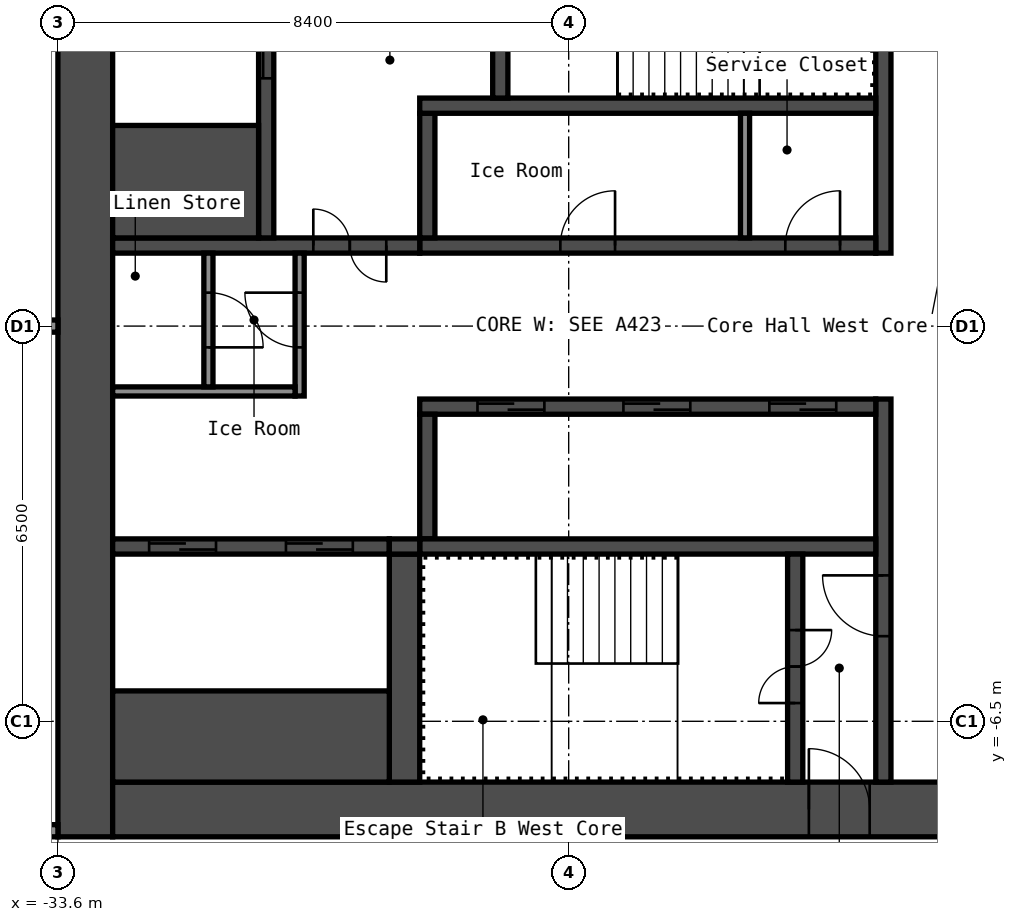
"""IFC4 building model, lengths in metres.
Left out: names, types, materials, properties, quantities, classifications, styles, units other than length and angle.
Written with IfcOpenShell. Run it as: python <this file> out.ifc"""

import sys

from ifc_helpers import new_model, si_unit, direction, frame, frame_2d, origin, place, context, subcontext, project, spatial, rectangle, extrude, element, fill, save


model = new_model("IFC4")
c1 = context("Model", 3, precision=1e-05, world=origin(), true_north=direction((0.0, 1.0)))
c2 = subcontext(c1, "Body", "Model", "MODEL_VIEW")
j1 = project(units=[si_unit("LENGTHUNIT", "METRE"), si_unit("PLANEANGLEUNIT", "RADIAN")], contexts=[c1])
p1 = place(None, origin())
s1 = spatial("IfcSite", under=j1, at=p1, CompositionType="ELEMENT")
p2 = place(p1, origin())
s2 = spatial("IfcBuilding", under=s1, at=p2, CompositionType="ELEMENT")
p3 = place(p2, frame((0.0, 0.0, 156.6)))
s3 = spatial("IfcBuildingStorey", under=s2, at=p3, CompositionType="ELEMENT", Elevation=156.6)
p4 = place(p3, frame((-33.15, -8.4, 0.0), z_axis=(0.0, 0.0, 1.0), x_axis=(0.0, 1.0, 0.0)))
e1 = element("IfcWall", 1, at=p4, inside=s3, PredefinedType="SHEAR", context=c2, shape_type="SweptSolid", body=[
    extrude(rectangle(XDim=16.8, YDim=0.9, at=frame_2d((8.4, 0.0))), origin(), (0.0, 0.0, 1.0), 2.75),
])
p5 = place(p3, frame((-32.7, -7.95, 0.0), z_axis=(0.0, 0.0, 1.0), x_axis=(1.0, 0.0, 0.0)))
e2 = element("IfcWall", 2, at=p5, inside=s3, PredefinedType="SHEAR", context=c2, shape_type="SweptSolid", body=[
    extrude(rectangle(XDim=15.0, YDim=0.9, at=frame_2d((7.5, 0.0))), origin(), (0.0, 0.0, 1.0), 2.75),
])
p6 = place(p5, frame((11.45, 0.0, 0.0)))
e3 = element("IfcOpeningElement", 3, at=p6, cuts=e2, PredefinedType="OPENING", context=c2, shape_type="SweptSolid", body=[
    extrude(rectangle(XDim=1.0, YDim=2.1, at=frame_2d((0.5, 1.05))), frame((0.0, 0.46, 0.0), z_axis=(0.0, -1.0, 0.0), x_axis=(1.0, 0.0, 0.0)), (0.0, 0.0, 1.0), 0.92),
])
p7 = place(p3, frame((-20.025, 1.2, 0.0), z_axis=(0.0, 0.0, 1.0), x_axis=(0.0, 1.0, 0.0)))
e4 = element("IfcWall", 4, at=p7, inside=s3, PredefinedType="SHEAR", context=c2, shape_type="SweptSolid", body=[
    extrude(rectangle(XDim=6.3, YDim=0.25, at=frame_2d((3.15, 0.0))), origin(), (0.0, 0.0, 1.0), 2.75),
])
p8 = place(p3, frame((-20.025, -7.5, 0.0), z_axis=(0.0, 0.0, 1.0), x_axis=(0.0, 1.0, 0.0)))
e5 = element("IfcWall", 5, at=p8, inside=s3, PredefinedType="SHEAR", context=c2, shape_type="SweptSolid", body=[
    extrude(rectangle(XDim=6.3, YDim=0.25, at=frame_2d((3.15, 0.0))), origin(), (0.0, 0.0, 1.0), 2.75),
])
p9 = place(p8, frame((2.4, 0.0, 0.0)))
e6 = element("IfcOpeningElement", 6, at=p9, cuts=e5, PredefinedType="OPENING", context=c2, shape_type="SweptSolid", body=[
    extrude(rectangle(XDim=1.0, YDim=2.1, at=frame_2d((0.5, 1.05))), frame((0.0, 0.135, 0.0), z_axis=(0.0, -1.0, 0.0), x_axis=(1.0, 0.0, 0.0)), (0.0, 0.0, 1.0), 0.27),
])
p10 = place(p3, frame((-27.65, 1.325, 0.0), z_axis=(0.0, 0.0, 1.0), x_axis=(1.0, 0.0, 0.0)))
e7 = element("IfcWall", 7, at=p10, inside=s3, PredefinedType="SHEAR", context=c2, shape_type="SweptSolid", body=[
    extrude(rectangle(XDim=7.5, YDim=0.25, at=frame_2d((3.75, 0.0))), origin(), (0.0, 0.0, 1.0), 2.75),
])
p11 = place(p10, frame((6.012, 0.0, 0.0)))
e8 = element("IfcOpeningElement", 8, at=p11, cuts=e7, PredefinedType="OPENING", context=c2, shape_type="SweptSolid", body=[
    extrude(rectangle(XDim=0.9, YDim=2.1, at=frame_2d((0.45, 1.05))), frame((0.0, 0.135, 0.0), z_axis=(0.0, -1.0, 0.0), x_axis=(1.0, 0.0, 0.0)), (0.0, 0.0, 1.0), 0.27),
])
p12 = place(p10, frame((2.312, 0.0, 0.0)))
e9 = element("IfcOpeningElement", 9, at=p12, cuts=e7, PredefinedType="OPENING", context=c2, shape_type="SweptSolid", body=[
    extrude(rectangle(XDim=0.9, YDim=2.1, at=frame_2d((0.45, 1.05))), frame((0.0, 0.135, 0.0), z_axis=(0.0, -1.0, 0.0), x_axis=(1.0, 0.0, 0.0)), (0.0, 0.0, 1.0), 0.27),
])
p13 = place(p3, frame((-27.525, 1.45, 0.0), z_axis=(0.0, 0.0, 1.0), x_axis=(0.0, 1.0, 0.0)))
e10 = element("IfcWall", 10, at=p13, inside=s3, PredefinedType="SHEAR", context=c2, shape_type="SweptSolid", body=[
    extrude(rectangle(XDim=2.05, YDim=0.25, at=frame_2d((1.025, 0.0))), origin(), (0.0, 0.0, 1.0), 2.75),
])
p14 = place(p3, frame((-27.65, 3.625, 0.0), z_axis=(0.0, 0.0, 1.0), x_axis=(1.0, 0.0, 0.0)))
e11 = element("IfcWall", 11, at=p14, inside=s3, PredefinedType="SHEAR", context=c2, shape_type="SweptSolid", body=[
    extrude(rectangle(XDim=7.5, YDim=0.25, at=frame_2d((3.75, 0.0))), origin(), (0.0, 0.0, 1.0), 2.75),
])
p15 = place(p3, frame((-26.325, 3.75, 0.0), z_axis=(0.0, 0.0, 1.0), x_axis=(0.0, 1.0, 0.0)))
e12 = element("IfcWall", 12, at=p15, inside=s3, PredefinedType="SHEAR", context=c2, shape_type="SweptSolid", body=[
    extrude(rectangle(XDim=3.75, YDim=0.25, at=frame_2d((1.875, 0.0))), origin(), (0.0, 0.0, 1.0), 2.75),
])
p16 = place(p15, frame((1.25, 0.0, 0.0)))
e13 = element("IfcOpeningElement", 13, at=p16, cuts=e12, PredefinedType="OPENING", context=c2, shape_type="SweptSolid", body=[
    extrude(rectangle(XDim=1.2, YDim=2.1, at=frame_2d((0.6, 1.05))), frame((0.0, 0.135, 0.0), z_axis=(0.0, -1.0, 0.0), x_axis=(1.0, 0.0, 0.0)), (0.0, 0.0, 1.0), 0.27),
])
p17 = place(p3, frame((-32.7, 1.325, 0.0), z_axis=(0.0, 0.0, 1.0), x_axis=(1.0, 0.0, 0.0)))
e14 = element("IfcWall", 14, at=p17, inside=s3, PredefinedType="SHEAR", context=c2, shape_type="SweptSolid", body=[
    extrude(rectangle(XDim=5.05, YDim=0.25, at=frame_2d((2.525, 0.0))), origin(), (0.0, 0.0, 1.0), 2.75),
])
p18 = place(p17, frame((3.3, 0.0, 0.0)))
e15 = element("IfcOpeningElement", 15, at=p18, cuts=e14, PredefinedType="OPENING", context=c2, shape_type="SweptSolid", body=[
    extrude(rectangle(XDim=1.2, YDim=2.1, at=frame_2d((0.6, 1.05))), frame((0.0, 0.135, 0.0), z_axis=(0.0, -1.0, 0.0), x_axis=(1.0, 0.0, 0.0)), (0.0, 0.0, 1.0), 0.27),
])
p19 = place(p3, frame((-30.175, 1.45, 0.0), z_axis=(0.0, 0.0, 1.0), x_axis=(0.0, 1.0, 0.0)))
e16 = element("IfcWall", 16, at=p19, inside=s3, PredefinedType="SHEAR", context=c2, shape_type="SweptSolid", body=[
    extrude(rectangle(XDim=6.05, YDim=0.25, at=frame_2d((3.025, 0.0))), origin(), (0.0, 0.0, 1.0), 2.75),
])
p20 = place(p19, frame((2.625, 0.0, 0.0)))
e17 = element("IfcOpeningElement", 17, at=p20, cuts=e16, PredefinedType="OPENING", context=c2, shape_type="SweptSolid", body=[
    extrude(rectangle(XDim=1.1, YDim=2.1, at=frame_2d((0.55, 1.05))), frame((0.0, 0.135, 0.0), z_axis=(0.0, -1.0, 0.0), x_axis=(1.0, 0.0, 0.0)), (0.0, 0.0, 1.0), 0.27),
])
p21 = place(p3, frame((-32.7, 2.375, 0.0), z_axis=(0.0, 0.0, 1.0), x_axis=(1.0, 0.0, 0.0)))
e18 = element("IfcWall", 18, at=p21, inside=s3, PredefinedType="SHEAR", context=c2, shape_type="SweptSolid", body=[
    extrude(rectangle(XDim=2.4, YDim=1.85, at=frame_2d((1.2, 0.0))), origin(), (0.0, 0.0, 1.0), 2.75),
])
p22 = place(p3, frame((-27.65, -1.325, 0.0), z_axis=(0.0, 0.0, 1.0), x_axis=(1.0, 0.0, 0.0)))
e19 = element("IfcWall", 19, at=p22, inside=s3, PredefinedType="SHEAR", context=c2, shape_type="SweptSolid", body=[
    extrude(rectangle(XDim=7.5, YDim=0.25, at=frame_2d((3.75, 0.0))), origin(), (0.0, 0.0, 1.0), 2.75),
])
p23 = place(p22, frame((5.75, 0.0, 0.0)))
e20 = element("IfcOpeningElement", 20, at=p23, cuts=e19, PredefinedType="OPENING", context=c2, shape_type="SweptSolid", body=[
    extrude(rectangle(XDim=1.1, YDim=2.1, at=frame_2d((0.55, 1.05))), frame((0.0, 0.135, 0.0), z_axis=(0.0, -1.0, 0.0), x_axis=(1.0, 0.0, 0.0)), (0.0, 0.0, 1.0), 0.27),
])
p24 = place(p22, frame((3.35, 0.0, 0.0)))
e21 = element("IfcOpeningElement", 21, at=p24, cuts=e19, PredefinedType="OPENING", context=c2, shape_type="SweptSolid", body=[
    extrude(rectangle(XDim=1.1, YDim=2.1, at=frame_2d((0.55, 1.05))), frame((0.0, 0.135, 0.0), z_axis=(0.0, -1.0, 0.0), x_axis=(1.0, 0.0, 0.0)), (0.0, 0.0, 1.0), 0.27),
])
p25 = place(p22, frame((0.95, 0.0, 0.0)))
e22 = element("IfcOpeningElement", 22, at=p25, cuts=e19, PredefinedType="OPENING", context=c2, shape_type="SweptSolid", body=[
    extrude(rectangle(XDim=1.1, YDim=2.1, at=frame_2d((0.55, 1.05))), frame((0.0, 0.135, 0.0), z_axis=(0.0, -1.0, 0.0), x_axis=(1.0, 0.0, 0.0)), (0.0, 0.0, 1.0), 0.27),
])
p26 = place(p3, frame((-27.525, -3.5, 0.0), z_axis=(0.0, 0.0, 1.0), x_axis=(0.0, 1.0, 0.0)))
e23 = element("IfcWall", 23, at=p26, inside=s3, PredefinedType="SHEAR", context=c2, shape_type="SweptSolid", body=[
    extrude(rectangle(XDim=2.05, YDim=0.25, at=frame_2d((1.025, 0.0))), origin(), (0.0, 0.0, 1.0), 2.75),
])
p27 = place(p3, frame((-27.65, -3.625, 0.0), z_axis=(0.0, 0.0, 1.0), x_axis=(1.0, 0.0, 0.0)))
e24 = element("IfcWall", 24, at=p27, inside=s3, PredefinedType="SHEAR", context=c2, shape_type="SweptSolid", body=[
    extrude(rectangle(XDim=7.5, YDim=0.25, at=frame_2d((3.75, 0.0))), origin(), (0.0, 0.0, 1.0), 2.75),
])
p28 = place(p3, frame((-21.475, -7.5, 0.0), z_axis=(0.0, 0.0, 1.0), x_axis=(0.0, 1.0, 0.0)))
e25 = element("IfcWall", 25, at=p28, inside=s3, PredefinedType="SHEAR", context=c2, shape_type="SweptSolid", body=[
    extrude(rectangle(XDim=3.75, YDim=0.25, at=frame_2d((1.875, 0.0))), origin(), (0.0, 0.0, 1.0), 2.75),
])
p29 = place(p28, frame((1.3, 0.0, 0.0)))
e26 = element("IfcOpeningElement", 26, at=p29, cuts=e25, PredefinedType="OPENING", context=c2, shape_type="SweptSolid", body=[
    extrude(rectangle(XDim=1.2, YDim=2.1, at=frame_2d((0.6, 1.05))), frame((0.0, 0.135, 0.0), z_axis=(0.0, -1.0, 0.0), x_axis=(1.0, 0.0, 0.0)), (0.0, 0.0, 1.0), 0.27),
])
p30 = place(p3, frame((-27.9, -7.5, 0.0), z_axis=(0.0, 0.0, 1.0), x_axis=(0.0, 1.0, 0.0)))
e27 = element("IfcWall", 27, at=p30, inside=s3, PredefinedType="SHEAR", context=c2, shape_type="SweptSolid", body=[
    extrude(rectangle(XDim=3.75, YDim=0.5, at=frame_2d((1.875, 0.0))), origin(), (0.0, 0.0, 1.0), 2.75),
])
p31 = place(p3, frame((-32.7, -3.625, 0.0), z_axis=(0.0, 0.0, 1.0), x_axis=(1.0, 0.0, 0.0)))
e28 = element("IfcWall", 28, at=p31, inside=s3, PredefinedType="SHEAR", context=c2, shape_type="SweptSolid", body=[
    extrude(rectangle(XDim=4.55, YDim=0.25, at=frame_2d((2.275, 0.0))), origin(), (0.0, 0.0, 1.0), 2.75),
])
p32 = place(p31, frame((2.85, 0.0, 0.0)))
e29 = element("IfcOpeningElement", 29, at=p32, cuts=e28, PredefinedType="OPENING", context=c2, shape_type="SweptSolid", body=[
    extrude(rectangle(XDim=1.1, YDim=2.1, at=frame_2d((0.55, 1.05))), frame((0.0, 0.135, 0.0), z_axis=(0.0, -1.0, 0.0), x_axis=(1.0, 0.0, 0.0)), (0.0, 0.0, 1.0), 0.27),
])
p33 = place(p31, frame((0.6, 0.0, 0.0)))
e30 = element("IfcOpeningElement", 30, at=p33, cuts=e28, PredefinedType="OPENING", context=c2, shape_type="SweptSolid", body=[
    extrude(rectangle(XDim=1.1, YDim=2.1, at=frame_2d((0.55, 1.05))), frame((0.0, 0.135, 0.0), z_axis=(0.0, -1.0, 0.0), x_axis=(1.0, 0.0, 0.0)), (0.0, 0.0, 1.0), 0.27),
])
p34 = place(p3, frame((-32.7, -6.75, 0.0), z_axis=(0.0, 0.0, 1.0), x_axis=(1.0, 0.0, 0.0)))
e31 = element("IfcWall", 31, at=p34, inside=s3, PredefinedType="SHEAR", context=c2, shape_type="SweptSolid", body=[
    extrude(rectangle(XDim=4.55, YDim=1.5, at=frame_2d((2.275, 0.0))), origin(), (0.0, 0.0, 1.0), 2.75),
])
p35 = place(p3, frame((-28.15, -3.625, 0.0), z_axis=(0.0, 0.0, 1.0), x_axis=(1.0, 0.0, 0.0)))
e32 = element("IfcWall", 32, at=p35, inside=s3, PredefinedType="SHEAR", context=c2, shape_type="SweptSolid", body=[
    extrude(rectangle(XDim=0.5, YDim=0.25, at=frame_2d((0.25, 0.0))), origin(), (0.0, 0.0, 1.0), 2.75),
])
p36 = place(p3, frame((-29.625, -1.15, 0.0), z_axis=(0.0, 0.0, 1.0), x_axis=(0.0, 1.0, 0.0)))
e33 = element("IfcWall", 33, at=p36, inside=s3, PredefinedType="PARTITIONING", context=c2, shape_type="SweptSolid", body=[
    extrude(rectangle(XDim=2.35, YDim=0.15, at=frame_2d((1.175, 0.0))), origin(), (0.0, 0.0, 1.0), 2.75),
])
p37 = place(p36, frame((0.8, 0.0, 0.0)))
e34 = element("IfcOpeningElement", 34, at=p37, cuts=e33, PredefinedType="OPENING", context=c2, shape_type="SweptSolid", body=[
    extrude(rectangle(XDim=0.9, YDim=2.1, at=frame_2d((0.45, 1.05))), frame((0.0, 0.085, 0.0), z_axis=(0.0, -1.0, 0.0), x_axis=(1.0, 0.0, 0.0)), (0.0, 0.0, 1.0), 0.17),
])
p38 = place(p3, frame((-32.7, -1.075, 0.0), z_axis=(0.0, 0.0, 1.0), x_axis=(1.0, 0.0, 0.0)))
e35 = element("IfcWall", 35, at=p38, inside=s3, PredefinedType="PARTITIONING", context=c2, shape_type="SweptSolid", body=[
    extrude(rectangle(XDim=3.0, YDim=0.15, at=frame_2d((1.5, 0.0))), origin(), (0.0, 0.0, 1.0), 2.75),
])
p39 = place(p3, frame((-31.125, -1.0, 0.0), z_axis=(0.0, 0.0, 1.0), x_axis=(0.0, 1.0, 0.0)))
e36 = element("IfcWall", 36, at=p39, inside=s3, PredefinedType="PARTITIONING", context=c2, shape_type="SweptSolid", body=[
    extrude(rectangle(XDim=2.2, YDim=0.15, at=frame_2d((1.1, 0.0))), origin(), (0.0, 0.0, 1.0), 2.75),
])
p40 = place(p39, frame((0.65, 0.0, 0.0)))
e37 = element("IfcOpeningElement", 37, at=p40, cuts=e36, PredefinedType="OPENING", context=c2, shape_type="SweptSolid", body=[
    extrude(rectangle(XDim=0.9, YDim=2.1, at=frame_2d((0.45, 1.05))), frame((0.0, 0.085, 0.0), z_axis=(0.0, -1.0, 0.0), x_axis=(1.0, 0.0, 0.0)), (0.0, 0.0, 1.0), 0.17),
])
p41 = place(p3, frame((-22.3, 1.45, 0.0), z_axis=(0.0, 0.0, 1.0), x_axis=(0.0, 1.0, 0.0)))
e38 = element("IfcWall", 38, at=p41, inside=s3, PredefinedType="PARTITIONING", context=c2, shape_type="SweptSolid", body=[
    extrude(rectangle(XDim=2.05, YDim=0.15, at=frame_2d((1.025, 0.0))), origin(), (0.0, 0.0, 1.0), 2.75),
])
p42 = place(p3, frame((-40.2, -8.3, 0.0), z_axis=(0.0, 0.0, 1.0), x_axis=(1.0, 0.0, 0.0)))
e39 = element("IfcWall", 39, at=p42, inside=s3, PredefinedType="PARTITIONING", context=c2, shape_type="SweptSolid", body=[
    extrude(rectangle(XDim=6.6, YDim=0.2, at=frame_2d((3.3, 0.0))), origin(), (0.0, 0.0, 1.0), 2.75),
])
p43 = place(p42, frame((1.07, 0.0, 0.0)))
e40 = element("IfcOpeningElement", 40, at=p43, cuts=e39, PredefinedType="OPENING", context=c2, shape_type="SweptSolid", body=[
    extrude(rectangle(XDim=0.9, YDim=2.1, at=frame_2d((0.45, 1.05))), frame((0.0, 0.11, 0.0), z_axis=(0.0, -1.0, 0.0), x_axis=(1.0, 0.0, 0.0)), (0.0, 0.0, 1.0), 0.22),
])
p44 = place(p42, frame((4.37, 0.0, 0.0)))
e41 = element("IfcOpeningElement", 41, at=p44, cuts=e39, PredefinedType="OPENING", context=c2, shape_type="SweptSolid", body=[
    extrude(rectangle(XDim=0.9, YDim=2.1, at=frame_2d((0.45, 1.05))), frame((0.0, 0.11, 0.0), z_axis=(0.0, -1.0, 0.0), x_axis=(1.0, 0.0, 0.0)), (0.0, 0.0, 1.0), 0.22),
])
p45 = place(p3, frame((-40.1, 0.0, 0.0), z_axis=(0.0, 0.0, 1.0), x_axis=(1.0, 0.0, 0.0)))
e42 = element("IfcWall", 42, at=p45, inside=s3, PredefinedType="PARTITIONING", context=c2, shape_type="SweptSolid", body=[
    extrude(rectangle(XDim=6.5, YDim=0.2, at=frame_2d((3.25, 0.0))), origin(), (0.0, 0.0, 1.0), 2.75),
])
p46 = place(p6, origin())
e43 = element("IfcDoor", 43, at=p46, inside=s3, OperationType="SINGLE_SWING_RIGHT", PredefinedType="DOOR", context=c2, shape_type="SweptSolid", body=[
    extrude(rectangle(XDim=1.0, YDim=2.1, at=frame_2d((0.5, 1.05))), frame((0.0, 0.025, 0.0), z_axis=(0.0, -1.0, 0.0), x_axis=(1.0, 0.0, 0.0)), (0.0, 0.0, 1.0), 0.05),
])
fill(e3, e43)
p47 = place(p29, origin())
e44 = element("IfcDoor", 44, at=p47, inside=s3, OperationType="DOUBLE_DOOR_SINGLE_SWING", PredefinedType="DOOR", context=c2, shape_type="SweptSolid", body=[
    extrude(rectangle(XDim=1.2, YDim=2.1, at=frame_2d((0.6, 1.05))), frame((0.0, 0.025, 0.0), z_axis=(0.0, -1.0, 0.0), x_axis=(1.0, 0.0, 0.0)), (0.0, 0.0, 1.0), 0.05),
])
fill(e26, e44)
p48 = place(p9, origin())
e45 = element("IfcDoor", 45, at=p48, inside=s3, OperationType="SINGLE_SWING_LEFT", PredefinedType="DOOR", context=c2, shape_type="SweptSolid", body=[
    extrude(rectangle(XDim=1.0, YDim=2.1, at=frame_2d((0.5, 1.05))), frame((0.0, 0.025, 0.0), z_axis=(0.0, -1.0, 0.0), x_axis=(1.0, 0.0, 0.0)), (0.0, 0.0, 1.0), 0.05),
])
fill(e6, e45)
p49 = place(p18, origin())
e46 = element("IfcDoor", 46, at=p49, inside=s3, OperationType="DOUBLE_DOOR_SINGLE_SWING", PredefinedType="DOOR", context=c2, shape_type="SweptSolid", body=[
    extrude(rectangle(XDim=1.2, YDim=2.1, at=frame_2d((0.6, 1.05))), frame((0.0, 0.025, 0.0), z_axis=(0.0, -1.0, 0.0), x_axis=(1.0, 0.0, 0.0)), (0.0, 0.0, 1.0), 0.05),
])
fill(e15, e46)
p50 = place(p37, origin())
e47 = element("IfcDoor", 47, at=p50, inside=s3, OperationType="SINGLE_SWING_LEFT", PredefinedType="DOOR", context=c2, shape_type="SweptSolid", body=[
    extrude(rectangle(XDim=0.9, YDim=2.1, at=frame_2d((0.45, 1.05))), frame((0.0, 0.025, 0.0), z_axis=(0.0, -1.0, 0.0), x_axis=(1.0, 0.0, 0.0)), (0.0, 0.0, 1.0), 0.05),
])
fill(e34, e47)
p51 = place(p40, origin())
e48 = element("IfcDoor", 48, at=p51, inside=s3, OperationType="SINGLE_SWING_LEFT", PredefinedType="DOOR", context=c2, shape_type="SweptSolid", body=[
    extrude(rectangle(XDim=0.9, YDim=2.1, at=frame_2d((0.45, 1.05))), frame((0.0, 0.025, 0.0), z_axis=(0.0, -1.0, 0.0), x_axis=(1.0, 0.0, 0.0)), (0.0, 0.0, 1.0), 0.05),
])
fill(e37, e48)
p52 = place(p11, origin())
e49 = element("IfcDoor", 49, at=p52, inside=s3, OperationType="SINGLE_SWING_LEFT", PredefinedType="DOOR", context=c2, shape_type="SweptSolid", body=[
    extrude(rectangle(XDim=0.9, YDim=2.1, at=frame_2d((0.45, 1.05))), frame((0.0, 0.025, 0.0), z_axis=(0.0, -1.0, 0.0), x_axis=(1.0, 0.0, 0.0)), (0.0, 0.0, 1.0), 0.05),
])
fill(e8, e49)
p53 = place(p12, origin())
e50 = element("IfcDoor", 50, at=p53, inside=s3, OperationType="SINGLE_SWING_LEFT", PredefinedType="DOOR", context=c2, shape_type="SweptSolid", body=[
    extrude(rectangle(XDim=0.9, YDim=2.1, at=frame_2d((0.45, 1.05))), frame((0.0, 0.025, 0.0), z_axis=(0.0, -1.0, 0.0), x_axis=(1.0, 0.0, 0.0)), (0.0, 0.0, 1.0), 0.05),
])
fill(e9, e50)
p54 = place(p23, origin())
e51 = element("IfcDoor", 51, at=p54, inside=s3, OperationType="DOUBLE_DOOR_SLIDING", PredefinedType="DOOR", context=c2, shape_type="SweptSolid", body=[
    extrude(rectangle(XDim=1.1, YDim=2.1, at=frame_2d((0.55, 1.05))), frame((0.0, 0.025, 0.0), z_axis=(0.0, -1.0, 0.0), x_axis=(1.0, 0.0, 0.0)), (0.0, 0.0, 1.0), 0.05),
])
fill(e20, e51)
p55 = place(p24, origin())
e52 = element("IfcDoor", 52, at=p55, inside=s3, OperationType="DOUBLE_DOOR_SLIDING", PredefinedType="DOOR", context=c2, shape_type="SweptSolid", body=[
    extrude(rectangle(XDim=1.1, YDim=2.1, at=frame_2d((0.55, 1.05))), frame((0.0, 0.025, 0.0), z_axis=(0.0, -1.0, 0.0), x_axis=(1.0, 0.0, 0.0)), (0.0, 0.0, 1.0), 0.05),
])
fill(e21, e52)
p56 = place(p25, origin())
e53 = element("IfcDoor", 53, at=p56, inside=s3, OperationType="DOUBLE_DOOR_SLIDING", PredefinedType="DOOR", context=c2, shape_type="SweptSolid", body=[
    extrude(rectangle(XDim=1.1, YDim=2.1, at=frame_2d((0.55, 1.05))), frame((0.0, 0.025, 0.0), z_axis=(0.0, -1.0, 0.0), x_axis=(1.0, 0.0, 0.0)), (0.0, 0.0, 1.0), 0.05),
])
fill(e22, e53)
p57 = place(p20, origin())
e54 = element("IfcDoor", 54, at=p57, inside=s3, OperationType="DOUBLE_DOOR_SLIDING", PredefinedType="DOOR", context=c2, shape_type="SweptSolid", body=[
    extrude(rectangle(XDim=1.1, YDim=2.1, at=frame_2d((0.55, 1.05))), frame((0.0, 0.025, 0.0), z_axis=(0.0, -1.0, 0.0), x_axis=(1.0, 0.0, 0.0)), (0.0, 0.0, 1.0), 0.05),
])
fill(e17, e54)
p58 = place(p32, origin())
e55 = element("IfcDoor", 55, at=p58, inside=s3, OperationType="DOUBLE_DOOR_SLIDING", PredefinedType="DOOR", context=c2, shape_type="SweptSolid", body=[
    extrude(rectangle(XDim=1.1, YDim=2.1, at=frame_2d((0.55, 1.05))), frame((0.0, 0.025, 0.0), z_axis=(0.0, -1.0, 0.0), x_axis=(1.0, 0.0, 0.0)), (0.0, 0.0, 1.0), 0.05),
])
fill(e29, e55)
p59 = place(p33, origin())
e56 = element("IfcDoor", 56, at=p59, inside=s3, OperationType="DOUBLE_DOOR_SLIDING", PredefinedType="DOOR", context=c2, shape_type="SweptSolid", body=[
    extrude(rectangle(XDim=1.1, YDim=2.1, at=frame_2d((0.55, 1.05))), frame((0.0, 0.025, 0.0), z_axis=(0.0, -1.0, 0.0), x_axis=(1.0, 0.0, 0.0)), (0.0, 0.0, 1.0), 0.05),
])
fill(e30, e56)
save(model, sys.argv[1])
